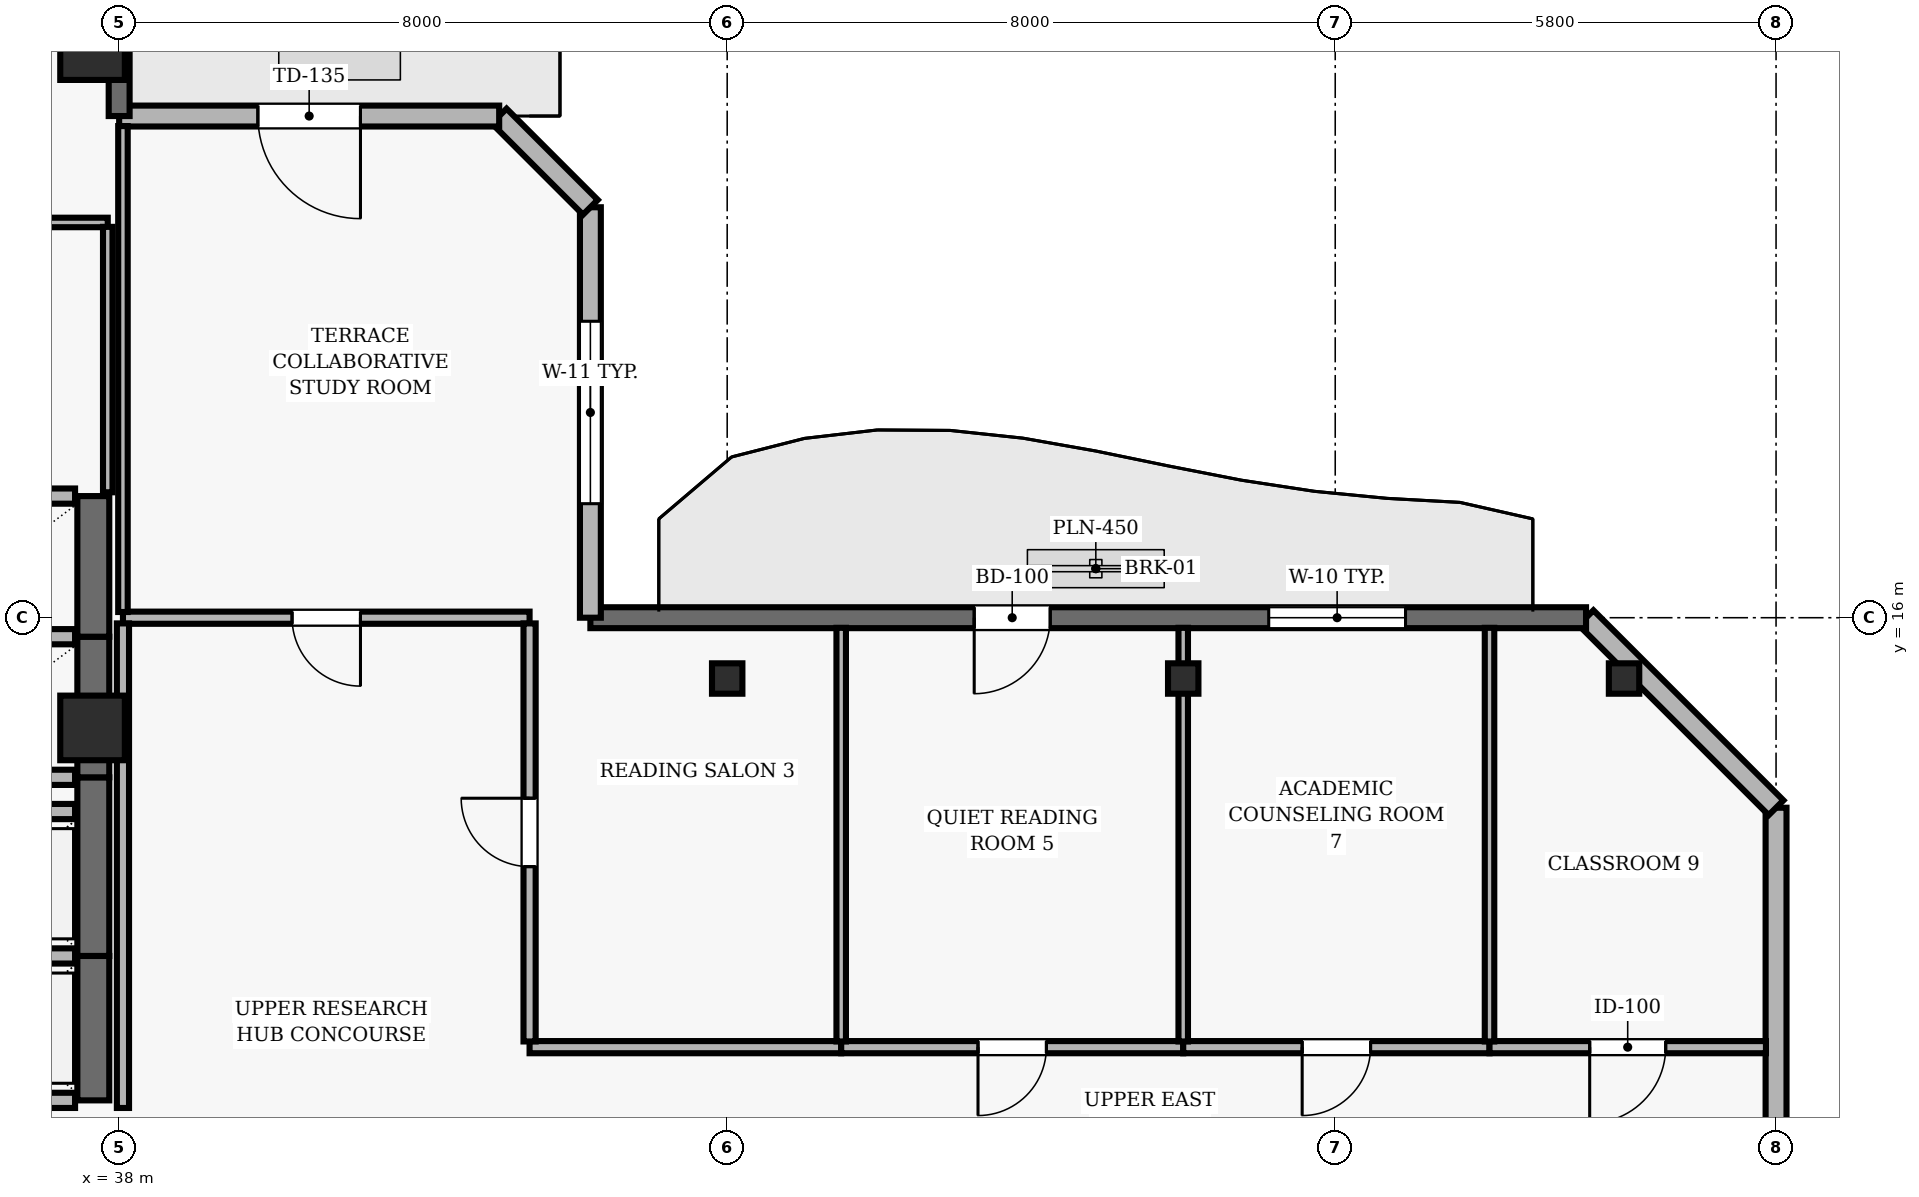
"""IFC4 building model, lengths in metres.
Left out: names, types, materials, properties, quantities, classifications, styles, units other than length and angle.
Written with IfcOpenShell. Run it as: python <this file> out.ifc"""

import sys

from ifc_helpers import new_model, si_unit, direction, frame, frame_2d, origin, origin_2d, place, context, subcontext, project, spatial, rectangle, hollow_rectangle, extrude, element, fill, save


model = new_model("IFC4")
c1 = context("Model", 3, precision=1e-05, world=origin(), true_north=direction((0.0, 1.0)))
c2 = subcontext(c1, "Body", "Model", "MODEL_VIEW")
j1 = project(units=[si_unit("LENGTHUNIT", "METRE"), si_unit("PLANEANGLEUNIT", "RADIAN")], contexts=[c1])
p1 = place(None, origin())
s1 = spatial("IfcSite", under=j1, at=p1, CompositionType="ELEMENT")
p2 = place(p1, origin())
s2 = spatial("IfcBuilding", under=s1, at=p2, CompositionType="ELEMENT")
p3 = place(p2, frame((0.0, 0.0, 267.7)))
s3 = spatial("IfcBuildingStorey", under=s2, at=p3, CompositionType="ELEMENT", Elevation=267.7)
for number, where, z_axis, x_axis in (
    (1, (37.65, 14.55, 0.0), (0.0, 0.0, 1.0), (1.0, 0.0, 0.0)),
    (2, (37.65, 23.5, 0.0), (0.0, 0.0, 1.0), (1.0, 0.0, 0.0)),
):
    element("IfcColumn", number, at=place(p3, frame(where, z_axis=z_axis, x_axis=x_axis)), inside=s3, PredefinedType="COLUMN", context=c2, shape_type="SweptSolid", body=[
        extrude(rectangle(XDim=0.85, YDim=0.85, at=origin_2d()), origin(), (0.0, 0.0, 1.0), 3.9),
    ])
for number, where, z_axis, x_axis in (
    (3, (46.0, 15.2, 0.0), (0.0, 0.0, 1.0), (1.0, 0.0, 0.0)),
    (4, (52.0, 15.2, 0.0), (0.0, 0.0, 1.0), (1.0, 0.0, 0.0)),
    (5, (57.8, 15.2, 0.0), (0.0, 0.0, 1.0), (1.0, 0.0, 0.0)),
):
    element("IfcColumn", number, at=place(p3, frame(where, z_axis=z_axis, x_axis=x_axis)), inside=s3, PredefinedType="COLUMN", context=c2, shape_type="SweptSolid", body=[
        extrude(hollow_rectangle(XDim=0.4, YDim=0.4, WallThickness=0.02, at=origin_2d()), origin(), (0.0, 0.0, 1.0), 3.9),
    ])
p4 = place(p3, frame((59.8, 2.5, 0.0), z_axis=(0.0, 0.0, 1.0), x_axis=(0.0, 1.0, 0.0)))
e6 = element("IfcWall", 6, at=p4, inside=s3, PredefinedType="SOLIDWALL", context=c2, shape_type="SweptSolid", body=[
    extrude(rectangle(XDim=11.0, YDim=0.275, at=frame_2d((5.5, 0.0))), origin(), (0.0, 0.0, 1.0), 3.69),
])
p5 = place(p4, frame((1.55, 0.0, 0.9)))
e7 = element("IfcOpeningElement", 7, at=p5, cuts=e6, PredefinedType="OPENING", context=c2, shape_type="SweptSolid", body=[
    extrude(rectangle(XDim=2.4, YDim=1.8, at=frame_2d((1.2, 0.9))), frame((0.0, 0.147, 0.0), z_axis=(0.0, -1.0, 0.0), x_axis=(1.0, 0.0, 0.0)), (0.0, 0.0, 1.0), 0.295),
])
p6 = place(p3, frame((59.8, 13.5, 0.0), z_axis=(0.0, 0.0, 1.0), x_axis=(-0.707106781187, 0.707106781187, 0.0)))
e8 = element("IfcWall", 8, at=p6, inside=s3, PredefinedType="SOLIDWALL", context=c2, shape_type="SweptSolid", body=[
    extrude(rectangle(XDim=3.536, YDim=0.275, at=frame_2d((1.768, 0.0))), origin(), (0.0, 0.0, 1.0), 3.69),
])
p7 = place(p3, frame((57.3, 16.0, 0.0), z_axis=(0.0, 0.0, 1.0), x_axis=(-1.0, 0.0, 0.0)))
e9 = element("IfcWall", 9, at=p7, inside=s3, PredefinedType="SOLIDWALL", context=c2, shape_type="SweptSolid", body=[
    extrude(rectangle(XDim=13.1, YDim=0.275, at=frame_2d((6.55, 0.0))), origin(), (0.0, 0.0, 1.0), 3.69),
])
p8 = place(p7, frame((7.05, 0.0, 0.0)))
e10 = element("IfcOpeningElement", 10, at=p8, cuts=e9, PredefinedType="OPENING", context=c2, shape_type="SweptSolid", body=[
    extrude(rectangle(XDim=1.0, YDim=2.2, at=frame_2d((0.5, 1.1))), frame((0.0, 0.147, 0.0), z_axis=(0.0, -1.0, 0.0), x_axis=(1.0, 0.0, 0.0)), (0.0, 0.0, 1.0), 0.295),
])
p9 = place(p7, frame((2.375, 0.0, 0.9)))
e11 = element("IfcOpeningElement", 11, at=p9, cuts=e9, PredefinedType="OPENING", context=c2, shape_type="SweptSolid", body=[
    extrude(rectangle(XDim=1.8, YDim=2.2, at=frame_2d((0.9, 1.1))), frame((0.0, 0.147, 0.0), z_axis=(0.0, -1.0, 0.0), x_axis=(1.0, 0.0, 0.0)), (0.0, 0.0, 1.0), 0.295),
])
p10 = place(p3, frame((44.2, 16.0, 0.0), z_axis=(0.0, 0.0, 1.0), x_axis=(0.0, 1.0, 0.0)))
e12 = element("IfcWall", 12, at=p10, inside=s3, PredefinedType="SOLIDWALL", context=c2, shape_type="SweptSolid", body=[
    extrude(rectangle(XDim=5.4, YDim=0.275, at=frame_2d((2.7, 0.0))), origin(), (0.0, 0.0, 1.0), 3.69),
])
p11 = place(p10, frame((1.5, 0.0, 0.9)))
e13 = element("IfcOpeningElement", 13, at=p11, cuts=e12, PredefinedType="OPENING", context=c2, shape_type="SweptSolid", body=[
    extrude(rectangle(XDim=2.4, YDim=2.2, at=frame_2d((1.2, 1.1))), frame((0.0, 0.147, 0.0), z_axis=(0.0, -1.0, 0.0), x_axis=(1.0, 0.0, 0.0)), (0.0, 0.0, 1.0), 0.295),
])
p12 = place(p3, frame((44.2, 21.4, 0.0), z_axis=(0.0, 0.0, 1.0), x_axis=(-0.707034851297, 0.707178703759, 0.0)))
e14 = element("IfcWall", 14, at=p12, inside=s3, PredefinedType="SOLIDWALL", context=c2, shape_type="SweptSolid", body=[
    extrude(rectangle(XDim=1.697, YDim=0.275, at=frame_2d((0.849, 0.0))), origin(), (0.0, 0.0, 1.0), 3.69),
])
p13 = place(p3, frame((43.0, 22.6, 0.0), z_axis=(0.0, 0.0, 1.0), x_axis=(-1.0, 0.0, 0.0)))
e15 = element("IfcWall", 15, at=p13, inside=s3, PredefinedType="SOLIDWALL", context=c2, shape_type="SweptSolid", body=[
    extrude(rectangle(XDim=5.0, YDim=0.275, at=frame_2d((2.5, 0.0))), origin(), (0.0, 0.0, 1.0), 3.69),
])
p14 = place(p13, frame((1.825, 0.0, 0.0)))
e16 = element("IfcOpeningElement", 16, at=p14, cuts=e15, PredefinedType="OPENING", context=c2, shape_type="SweptSolid", body=[
    extrude(rectangle(XDim=1.35, YDim=2.2, at=frame_2d((0.675, 1.1))), frame((0.0, 0.147, 0.0), z_axis=(0.0, -1.0, 0.0), x_axis=(1.0, 0.0, 0.0)), (0.0, 0.0, 1.0), 0.295),
])
p15 = place(p3, frame((38.0, 22.6, 0.0), z_axis=(0.0, 0.0, 1.0), x_axis=(0.0, 1.0, 0.0)))
e17 = element("IfcWall", 17, at=p15, inside=s3, PredefinedType="SOLIDWALL", context=c2, shape_type="SweptSolid", body=[
    extrude(rectangle(XDim=12.7, YDim=0.275, at=frame_2d((6.35, 0.0))), origin(), (0.0, 0.0, 1.0), 3.69),
])
p16 = place(p15, frame((8.875, 0.0, 0.0)))
e18 = element("IfcOpeningElement", 18, at=p16, cuts=e17, PredefinedType="OPENING", context=c2, shape_type="SweptSolid", body=[
    extrude(rectangle(XDim=1.0, YDim=2.2, at=frame_2d((0.5, 1.1))), frame((0.0, 0.147, 0.0), z_axis=(0.0, -1.0, 0.0), x_axis=(1.0, 0.0, 0.0)), (0.0, 0.0, 1.0), 0.295),
])
p17 = place(p3, frame((37.66, 9.65, 0.0), z_axis=(0.0, 0.0, 1.0), x_axis=(0.0, 1.0, 0.0)))
e19 = element("IfcWall", 19, at=p17, inside=s3, PredefinedType="SHEAR", context=c2, shape_type="SweptSolid", body=[
    extrude(rectangle(XDim=1.9, YDim=0.42, at=frame_2d((0.95, 0.0))), origin(), (0.0, 0.0, 1.0), 3.69),
])
for number, where, z_axis, x_axis in (
    (20, (35.28, 9.65, 0.0), (0.0, 0.0, 1.0), (1.0, 0.0, 0.0)),
    (21, (37.42, 11.55, 0.0), (0.0, 0.0, 1.0), (-1.0, 0.0, 0.0)),
):
    element("IfcWall", number, at=place(p3, frame(where, z_axis=z_axis, x_axis=x_axis)), inside=s3, PredefinedType="SOLIDWALL", context=c2, shape_type="SweptSolid", body=[
        extrude(rectangle(XDim=2.14, YDim=0.2, at=frame_2d((1.07, 0.0))), origin(), (0.0, 0.0, 1.0), 3.69),
    ])
p18 = place(p3, frame((37.66, 11.55, 0.0), z_axis=(0.0, 0.0, 1.0), x_axis=(0.0, 1.0, 0.0)))
e22 = element("IfcWall", 22, at=p18, inside=s3, PredefinedType="SHEAR", context=c2, shape_type="SweptSolid", body=[
    extrude(rectangle(XDim=2.35, YDim=0.42, at=frame_2d((1.175, 0.0))), origin(), (0.0, 0.0, 1.0), 3.69),
])
p19 = place(p3, frame((37.42, 13.45, 0.0), z_axis=(0.0, 0.0, 1.0), x_axis=(-1.0, 0.0, 0.0)))
e23 = element("IfcWall", 23, at=p19, inside=s3, PredefinedType="SOLIDWALL", context=c2, shape_type="SweptSolid", body=[
    extrude(rectangle(XDim=2.14, YDim=0.2, at=frame_2d((1.07, 0.0))), origin(), (0.0, 0.0, 1.0), 3.69),
])
p20 = place(p3, frame((37.66, 13.9, 0.0), z_axis=(0.0, 0.0, 1.0), x_axis=(0.0, 1.0, 0.0)))
e24 = element("IfcWall", 24, at=p20, inside=s3, PredefinedType="SHEAR", context=c2, shape_type="SweptSolid", body=[
    extrude(rectangle(XDim=1.85, YDim=0.42, at=frame_2d((0.925, 0.0))), origin(), (0.0, 0.0, 1.0), 3.69),
])
for number, where, z_axis, x_axis in (
    (25, (35.28, 13.9, 0.0), (0.0, 0.0, 1.0), (1.0, 0.0, 0.0)),
    (26, (37.42, 15.75, 0.0), (0.0, 0.0, 1.0), (-1.0, 0.0, 0.0)),
):
    element("IfcWall", number, at=place(p3, frame(where, z_axis=z_axis, x_axis=x_axis)), inside=s3, PredefinedType="SOLIDWALL", context=c2, shape_type="SweptSolid", body=[
        extrude(rectangle(XDim=2.14, YDim=0.2, at=frame_2d((1.07, 0.0))), origin(), (0.0, 0.0, 1.0), 3.69),
    ])
p21 = place(p3, frame((37.66, 15.75, 0.0), z_axis=(0.0, 0.0, 1.0), x_axis=(0.0, 1.0, 0.0)))
e27 = element("IfcWall", 27, at=p21, inside=s3, PredefinedType="SHEAR", context=c2, shape_type="SweptSolid", body=[
    extrude(rectangle(XDim=1.85, YDim=0.42, at=frame_2d((0.925, 0.0))), origin(), (0.0, 0.0, 1.0), 3.69),
])
p22 = place(p3, frame((37.42, 17.6, 0.0), z_axis=(0.0, 0.0, 1.0), x_axis=(-1.0, 0.0, 0.0)))
e28 = element("IfcWall", 28, at=p22, inside=s3, PredefinedType="SOLIDWALL", context=c2, shape_type="SweptSolid", body=[
    extrude(rectangle(XDim=2.14, YDim=0.2, at=frame_2d((1.07, 0.0))), origin(), (0.0, 0.0, 1.0), 3.69),
])
p23 = place(p3, frame((35.85, 21.2, 0.0), z_axis=(0.0, 0.0, 1.0), x_axis=(1.0, 0.0, 0.0)))
e29 = element("IfcWall", 29, at=p23, inside=s3, PredefinedType="PARTITIONING", context=c2, shape_type="SweptSolid", body=[
    extrude(rectangle(XDim=2.0, YDim=0.125, at=frame_2d((1.0, 0.0))), origin(), (0.0, 0.0, 1.0), 3.69),
])
p24 = place(p3, frame((43.4, 16.0, 0.0), z_axis=(0.0, 0.0, 1.0), x_axis=(-1.0, 0.0, 0.0)))
e30 = element("IfcWall", 30, at=p24, inside=s3, PredefinedType="PARTITIONING", context=c2, shape_type="SweptSolid", body=[
    extrude(rectangle(XDim=5.35, YDim=0.16, at=frame_2d((2.675, 0.0))), origin(), (0.0, 0.0, 1.0), 3.39),
])
p25 = place(p24, frame((2.225, 0.0, 0.0)))
e31 = element("IfcOpeningElement", 31, at=p25, cuts=e30, PredefinedType="OPENING", context=c2, shape_type="SweptSolid", body=[
    extrude(rectangle(XDim=0.9, YDim=2.1, at=frame_2d((0.45, 1.05))), frame((0.0, 0.09, 0.0), z_axis=(0.0, -1.0, 0.0), x_axis=(1.0, 0.0, 0.0)), (0.0, 0.0, 1.0), 0.18),
])
p26 = place(p3, frame((47.5, 10.35, 0.0), z_axis=(0.0, 0.0, 1.0), x_axis=(-1.0, 0.0, 0.0)))
e32 = element("IfcWall", 32, at=p26, inside=s3, PredefinedType="PARTITIONING", context=c2, shape_type="SweptSolid", body=[
    extrude(rectangle(XDim=4.1, YDim=0.16, at=frame_2d((2.05, 0.0))), origin(), (0.0, 0.0, 1.0), 3.424),
])
p27 = place(p3, frame((52.0, 10.35, 0.0), z_axis=(0.0, 0.0, 1.0), x_axis=(-1.0, 0.0, 0.0)))
e33 = element("IfcWall", 33, at=p27, inside=s3, PredefinedType="PARTITIONING", context=c2, shape_type="SweptSolid", body=[
    extrude(rectangle(XDim=4.5, YDim=0.16, at=frame_2d((2.25, 0.0))), origin(), (0.0, 0.0, 1.0), 3.424),
])
p28 = place(p27, frame((1.8, 0.0, 0.0)))
e34 = element("IfcOpeningElement", 34, at=p28, cuts=e33, PredefinedType="OPENING", context=c2, shape_type="SweptSolid", body=[
    extrude(rectangle(XDim=0.9, YDim=2.1, at=frame_2d((0.45, 1.05))), frame((0.0, 0.09, 0.0), z_axis=(0.0, -1.0, 0.0), x_axis=(1.0, 0.0, 0.0)), (0.0, 0.0, 1.0), 0.18),
])
p29 = place(p3, frame((56.03, 10.35, 0.0), z_axis=(0.0, 0.0, 1.0), x_axis=(-1.0, 0.0, 0.0)))
e35 = element("IfcWall", 35, at=p29, inside=s3, PredefinedType="PARTITIONING", context=c2, shape_type="SweptSolid", body=[
    extrude(rectangle(XDim=4.03, YDim=0.16, at=frame_2d((2.015, 0.0))), origin(), (0.0, 0.0, 1.0), 3.424),
])
p30 = place(p29, frame((1.565, 0.0, 0.0)))
e36 = element("IfcOpeningElement", 36, at=p30, cuts=e35, PredefinedType="OPENING", context=c2, shape_type="SweptSolid", body=[
    extrude(rectangle(XDim=0.9, YDim=2.1, at=frame_2d((0.45, 1.05))), frame((0.0, 0.09, 0.0), z_axis=(0.0, -1.0, 0.0), x_axis=(1.0, 0.0, 0.0)), (0.0, 0.0, 1.0), 0.18),
])
p31 = place(p3, frame((59.667, 10.35, 0.0), z_axis=(0.0, 0.0, 1.0), x_axis=(-1.0, 0.0, 0.0)))
e37 = element("IfcWall", 37, at=p31, inside=s3, PredefinedType="PARTITIONING", context=c2, shape_type="SweptSolid", body=[
    extrude(rectangle(XDim=3.637, YDim=0.16, at=frame_2d((1.818, 0.0))), origin(), (0.0, 0.0, 1.0), 3.424),
])
p32 = place(p31, frame((1.319, 0.0, 0.0)))
e38 = element("IfcOpeningElement", 38, at=p32, cuts=e37, PredefinedType="OPENING", context=c2, shape_type="SweptSolid", body=[
    extrude(rectangle(XDim=1.0, YDim=2.1, at=frame_2d((0.5, 1.05))), frame((0.0, 0.09, 0.0), z_axis=(0.0, -1.0, 0.0), x_axis=(1.0, 0.0, 0.0)), (0.0, 0.0, 1.0), 0.18),
])
p33 = place(p3, frame((37.85, 17.65, 0.0), z_axis=(0.0, 0.0, 1.0), x_axis=(0.0, 1.0, 0.0)))
e39 = element("IfcWall", 39, at=p33, inside=s3, PredefinedType="PARTITIONING", context=c2, shape_type="SweptSolid", body=[
    extrude(rectangle(XDim=3.492, YDim=0.125, at=frame_2d((1.746, 0.0))), origin(), (0.0, 0.0, 1.0), 3.227),
])
p34 = place(p3, frame((38.05, 15.925, 0.0), z_axis=(0.0, 0.0, 1.0), x_axis=(0.0, -1.0, 0.0)))
e40 = element("IfcWall", 40, at=p34, inside=s3, PredefinedType="PARTITIONING", context=c2, shape_type="SweptSolid", body=[
    extrude(rectangle(XDim=6.375, YDim=0.16, at=frame_2d((3.188, 0.0))), origin(), (0.0, 0.0, 1.0), 3.227),
])
p35 = place(p3, frame((38.05, 22.468, 0.0), z_axis=(0.0, 0.0, 1.0), x_axis=(0.0, -1.0, 0.0)))
e41 = element("IfcWall", 41, at=p35, inside=s3, PredefinedType="PARTITIONING", context=c2, shape_type="SweptSolid", body=[
    extrude(rectangle(XDim=6.393, YDim=0.125, at=frame_2d((3.197, 0.0))), origin(), (0.0, 0.0, 1.0), 3.227),
])
p36 = place(p3, frame((43.4, 10.425, 0.0), z_axis=(0.0, 0.0, 1.0), x_axis=(0.0, 1.0, 0.0)))
e42 = element("IfcWall", 42, at=p36, inside=s3, PredefinedType="PARTITIONING", context=c2, shape_type="SweptSolid", body=[
    extrude(rectangle(XDim=5.5, YDim=0.16, at=frame_2d((2.75, 0.0))), origin(), (0.0, 0.0, 1.0), 3.69),
])
p37 = place(p36, frame((2.3, 0.0, 0.0)))
e43 = element("IfcOpeningElement", 43, at=p37, cuts=e42, PredefinedType="OPENING", context=c2, shape_type="SweptSolid", body=[
    extrude(rectangle(XDim=0.9, YDim=2.1, at=frame_2d((0.45, 1.05))), frame((0.0, 0.09, 0.0), z_axis=(0.0, -1.0, 0.0), x_axis=(1.0, 0.0, 0.0)), (0.0, 0.0, 1.0), 0.18),
])
p38 = place(p3, frame((47.5, 10.425, 0.0), z_axis=(0.0, 0.0, 1.0), x_axis=(0.0, 1.0, 0.0)))
e44 = element("IfcWall", 44, at=p38, inside=s3, PredefinedType="PARTITIONING", context=c2, shape_type="SweptSolid", body=[
    extrude(rectangle(XDim=5.442, YDim=0.125, at=frame_2d((2.721, 0.0))), origin(), (0.0, 0.0, 1.0), 3.69),
])
p39 = place(p3, frame((52.0, 10.425, 0.0), z_axis=(0.0, 0.0, 1.0), x_axis=(0.0, 1.0, 0.0)))
e45 = element("IfcWall", 45, at=p39, inside=s3, PredefinedType="PARTITIONING", context=c2, shape_type="SweptSolid", body=[
    extrude(rectangle(XDim=5.442, YDim=0.125, at=frame_2d((2.721, 0.0))), origin(), (0.0, 0.0, 1.0), 3.227),
])
p40 = place(p3, frame((56.03, 10.425, 0.0), z_axis=(0.0, 0.0, 1.0), x_axis=(0.0, 1.0, 0.0)))
e46 = element("IfcWall", 46, at=p40, inside=s3, PredefinedType="PARTITIONING", context=c2, shape_type="SweptSolid", body=[
    extrude(rectangle(XDim=5.442, YDim=0.125, at=frame_2d((2.721, 0.0))), origin(), (0.0, 0.0, 1.0), 3.69),
])
p41 = place(p8, origin())
e47 = element("IfcDoor", 47, at=p41, inside=s3, OperationType="SINGLE_SWING_RIGHT", PredefinedType="DOOR", context=c2, shape_type="SweptSolid", body=[
    extrude(rectangle(XDim=1.0, YDim=2.2, at=frame_2d((0.5, 1.1))), frame((0.0, 0.025, 0.0), z_axis=(0.0, -1.0, 0.0), x_axis=(1.0, 0.0, 0.0)), (0.0, 0.0, 1.0), 0.05),
])
fill(e10, e47)
p42 = place(p9, origin())
e48 = element("IfcWindow", 48, at=p42, inside=s3, PartitioningType="SINGLE_PANEL", PredefinedType="WINDOW", context=c2, shape_type="SweptSolid", body=[
    extrude(rectangle(XDim=1.8, YDim=2.2, at=frame_2d((0.9, 1.1))), frame((0.0, 0.03, 0.0), z_axis=(0.0, -1.0, 0.0), x_axis=(1.0, 0.0, 0.0)), (0.0, 0.0, 1.0), 0.06),
])
fill(e11, e48)
p43 = place(p11, origin())
e49 = element("IfcWindow", 49, at=p43, inside=s3, PartitioningType="SINGLE_PANEL", PredefinedType="WINDOW", context=c2, shape_type="SweptSolid", body=[
    extrude(rectangle(XDim=2.4, YDim=2.2, at=frame_2d((1.2, 1.1))), frame((0.0, 0.03, 0.0), z_axis=(0.0, -1.0, 0.0), x_axis=(1.0, 0.0, 0.0)), (0.0, 0.0, 1.0), 0.06),
])
fill(e13, e49)
p44 = place(p14, origin())
e50 = element("IfcDoor", 50, at=p44, inside=s3, OperationType="SINGLE_SWING_LEFT", PredefinedType="DOOR", context=c2, shape_type="SweptSolid", body=[
    extrude(rectangle(XDim=1.35, YDim=2.2, at=frame_2d((0.675, 1.1))), frame((0.0, 0.025, 0.0), z_axis=(0.0, -1.0, 0.0), x_axis=(1.0, 0.0, 0.0)), (0.0, 0.0, 1.0), 0.05),
])
fill(e16, e50)
p45 = place(p37, origin())
e51 = element("IfcDoor", 51, at=p45, inside=s3, OperationType="SINGLE_SWING_RIGHT", PredefinedType="DOOR", context=c2, shape_type="SweptSolid", body=[
    extrude(rectangle(XDim=0.9, YDim=2.1, at=frame_2d((0.45, 1.05))), frame((0.0, 0.025, 0.0), z_axis=(0.0, -1.0, 0.0), x_axis=(1.0, 0.0, 0.0)), (0.0, 0.0, 1.0), 0.05),
])
fill(e43, e51)
p46 = place(p28, origin())
e52 = element("IfcDoor", 52, at=p46, inside=s3, OperationType="SINGLE_SWING_RIGHT", PredefinedType="DOOR", context=c2, shape_type="SweptSolid", body=[
    extrude(rectangle(XDim=0.9, YDim=2.1, at=frame_2d((0.45, 1.05))), frame((0.0, 0.025, 0.0), z_axis=(0.0, -1.0, 0.0), x_axis=(1.0, 0.0, 0.0)), (0.0, 0.0, 1.0), 0.05),
])
fill(e34, e52)
p47 = place(p30, origin())
e53 = element("IfcDoor", 53, at=p47, inside=s3, OperationType="SINGLE_SWING_RIGHT", PredefinedType="DOOR", context=c2, shape_type="SweptSolid", body=[
    extrude(rectangle(XDim=0.9, YDim=2.1, at=frame_2d((0.45, 1.05))), frame((0.0, 0.025, 0.0), z_axis=(0.0, -1.0, 0.0), x_axis=(1.0, 0.0, 0.0)), (0.0, 0.0, 1.0), 0.05),
])
fill(e36, e53)
p48 = place(p32, origin())
e54 = element("IfcDoor", 54, at=p48, inside=s3, OperationType="SINGLE_SWING_RIGHT", PredefinedType="DOOR", context=c2, shape_type="SweptSolid", body=[
    extrude(rectangle(XDim=1.0, YDim=2.1, at=frame_2d((0.5, 1.05))), frame((0.0, 0.025, 0.0), z_axis=(0.0, -1.0, 0.0), x_axis=(1.0, 0.0, 0.0)), (0.0, 0.0, 1.0), 0.05),
])
fill(e38, e54)
p49 = place(p25, origin())
e55 = element("IfcDoor", 55, at=p49, inside=s3, OperationType="SINGLE_SWING_LEFT", PredefinedType="DOOR", context=c2, shape_type="SweptSolid", body=[
    extrude(rectangle(XDim=0.9, YDim=2.1, at=frame_2d((0.45, 1.05))), frame((0.0, 0.025, 0.0), z_axis=(0.0, -1.0, 0.0), x_axis=(1.0, 0.0, 0.0)), (0.0, 0.0, 1.0), 0.05),
])
fill(e31, e55)
save(model, sys.argv[1])
